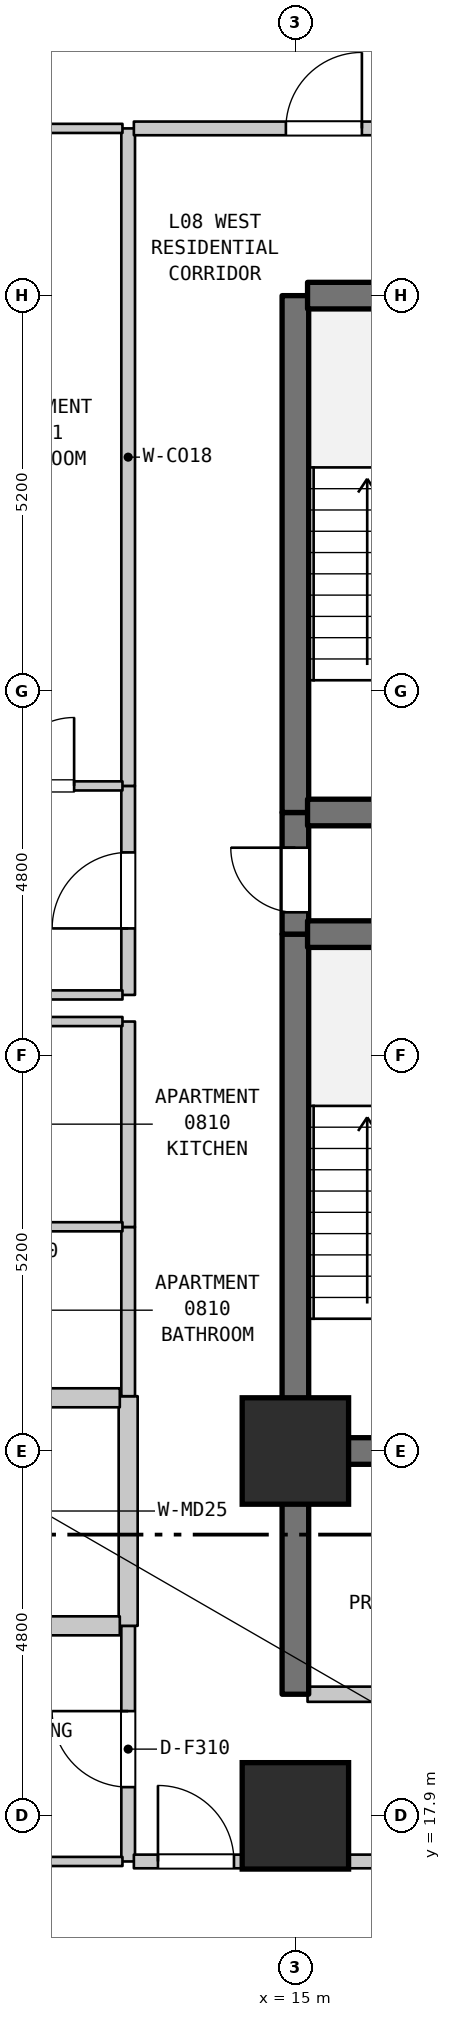
"""IFC4 building model, lengths in metres.
Left out: names, types, materials, properties, quantities, classifications, styles, units other than length and angle.
Written with IfcOpenShell. Run it as: python <this file> out.ifc"""

import sys

from ifc_helpers import new_model, si_unit, direction, frame, frame_2d, origin, origin_2d, place, context, subcontext, project, spatial, rectangle, extrude, element, fill, save


model = new_model("IFC4")
c1 = context("Model", 3, precision=1e-05, world=origin(), true_north=direction((0.0, 1.0)))
c2 = subcontext(c1, "Body", "Model", "MODEL_VIEW")
j1 = project(units=[si_unit("LENGTHUNIT", "METRE"), si_unit("PLANEANGLEUNIT", "RADIAN")], contexts=[c1])
p1 = place(None, origin())
s1 = spatial("IfcSite", under=j1, at=p1, CompositionType="ELEMENT")
p2 = place(p1, origin())
s2 = spatial("IfcBuilding", under=s1, at=p2, CompositionType="ELEMENT")
p3 = place(p2, frame((0.0, 0.0, 38.8)))
s3 = spatial("IfcBuildingStorey", under=s2, at=p3, CompositionType="ELEMENT", Elevation=38.8)
for number, where, z_axis, x_axis in (
    (1, (15.0, 17.9, 0.0), (0.0, 0.0, 1.0), (1.0, 0.0, 0.0)),
    (2, (15.0, 22.7, 0.0), (0.0, 0.0, 1.0), (1.0, 0.0, 0.0)),
):
    element("IfcColumn", number, at=place(p3, frame(where, z_axis=z_axis, x_axis=x_axis)), inside=s3, PredefinedType="COLUMN", context=c2, shape_type="SweptSolid", body=[
        extrude(rectangle(XDim=1.4, YDim=1.4, at=origin_2d()), origin(), (0.0, 0.0, 1.0), 3.7),
    ])
p4 = place(p3, frame((12.8, 17.3, 0.0), z_axis=(0.0, 0.0, 1.0), x_axis=(0.0, 1.0, 0.0)))
e3 = element("IfcWall", 3, at=p4, inside=s3, PredefinedType="STANDARD", context=c2, shape_type="SweptSolid", body=[
    extrude(rectangle(XDim=3.1, YDim=0.18, at=frame_2d((1.55, 0.0))), origin(), (0.0, 0.0, 1.0), 3.385),
])
p5 = place(p4, frame((0.978, 0.0, 0.0)))
e4 = element("IfcOpeningElement", 4, at=p5, cuts=e3, PredefinedType="OPENING", context=c2, shape_type="SweptSolid", body=[
    extrude(rectangle(XDim=1.0, YDim=2.15, at=frame_2d((0.5, 1.075))), frame((0.0, 0.1, 0.0), z_axis=(0.0, -1.0, 0.0), x_axis=(1.0, 0.0, 0.0)), (0.0, 0.0, 1.0), 0.2),
])
p6 = place(p3, frame((12.8, 20.4, 0.0), z_axis=(0.0, 0.0, 1.0), x_axis=(0.0, 1.0, 0.0)))
e5 = element("IfcWall", 5, at=p6, inside=s3, PredefinedType="STANDARD", context=c2, shape_type="SweptSolid", body=[
    extrude(rectangle(XDim=3.021, YDim=0.25, at=frame_2d((1.51, 0.0))), origin(), (0.0, 0.0, 1.0), 3.385),
])
p7 = place(p3, frame((12.8, 23.421, 0.0), z_axis=(0.0, 0.0, 1.0), x_axis=(0.0, 1.0, 0.0)))
e6 = element("IfcWall", 6, at=p7, inside=s3, PredefinedType="STANDARD", context=c2, shape_type="SweptSolid", body=[
    extrude(rectangle(XDim=2.226, YDim=0.18, at=frame_2d((1.113, 0.0))), origin(), (0.0, 0.0, 1.0), 3.385),
])
p8 = place(p3, frame((12.8, 25.647, 0.0), z_axis=(0.0, 0.0, 1.0), x_axis=(0.0, 1.0, 0.0)))
e7 = element("IfcWall", 7, at=p8, inside=s3, PredefinedType="STANDARD", context=c2, shape_type="SweptSolid", body=[
    extrude(rectangle(XDim=2.703, YDim=0.18, at=frame_2d((1.352, 0.0))), origin(), (0.0, 0.0, 1.0), 3.385),
])
p9 = place(p3, frame((12.8, 28.7, 0.0), z_axis=(0.0, 0.0, 1.0), x_axis=(0.0, 1.0, 0.0)))
e8 = element("IfcWall", 8, at=p9, inside=s3, PredefinedType="STANDARD", context=c2, shape_type="SweptSolid", body=[
    extrude(rectangle(XDim=2.75, YDim=0.18, at=frame_2d((1.375, 0.0))), origin(), (0.0, 0.0, 1.0), 3.385),
])
p10 = place(p9, frame((0.875, 0.0, 0.0)))
e9 = element("IfcOpeningElement", 9, at=p10, cuts=e8, PredefinedType="OPENING", context=c2, shape_type="SweptSolid", body=[
    extrude(rectangle(XDim=1.0, YDim=2.15, at=frame_2d((0.5, 1.075))), frame((0.0, 0.1, 0.0), z_axis=(0.0, -1.0, 0.0), x_axis=(1.0, 0.0, 0.0)), (0.0, 0.0, 1.0), 0.2),
])
p11 = place(p3, frame((12.8, 31.45, 0.0), z_axis=(0.0, 0.0, 1.0), x_axis=(0.0, 1.0, 0.0)))
e10 = element("IfcWall", 10, at=p11, inside=s3, PredefinedType="STANDARD", context=c2, shape_type="SweptSolid", body=[
    extrude(rectangle(XDim=8.65, YDim=0.18, at=frame_2d((4.325, 0.0))), origin(), (0.0, 0.0, 1.0), 3.385),
])
p12 = place(p3, frame((15.0, 19.5, 0.0), z_axis=(0.0, 0.0, 1.0), x_axis=(0.0, 1.0, 0.0)))
e11 = element("IfcWall", 11, at=p12, inside=s3, PredefinedType="SHEAR", context=c2, shape_type="SweptSolid", body=[
    extrude(rectangle(XDim=3.2, YDim=0.35, at=frame_2d((1.6, 0.0))), origin(), (0.0, 0.0, 1.0), 3.385),
])
p13 = place(p3, frame((15.0, 22.7, 0.0), z_axis=(0.0, 0.0, 1.0), x_axis=(0.0, 1.0, 0.0)))
e12 = element("IfcWall", 12, at=p13, inside=s3, PredefinedType="SHEAR", context=c2, shape_type="SweptSolid", body=[
    extrude(rectangle(XDim=6.8, YDim=0.35, at=frame_2d((3.4, 0.0))), origin(), (0.0, 0.0, 1.0), 3.385),
])
p14 = place(p3, frame((15.0, 29.5, 0.0), z_axis=(0.0, 0.0, 1.0), x_axis=(0.0, 1.0, 0.0)))
e13 = element("IfcWall", 13, at=p14, inside=s3, PredefinedType="SHEAR", context=c2, shape_type="SweptSolid", body=[
    extrude(rectangle(XDim=1.6, YDim=0.35, at=frame_2d((0.8, 0.0))), origin(), (0.0, 0.0, 1.0), 3.385),
])
p15 = place(p14, frame((0.287, 0.0, 0.0)))
e14 = element("IfcOpeningElement", 14, at=p15, cuts=e13, PredefinedType="OPENING", context=c2, shape_type="SweptSolid", body=[
    extrude(rectangle(XDim=0.85, YDim=2.1, at=frame_2d((0.425, 1.05))), frame((0.0, 0.185, 0.0), z_axis=(0.0, -1.0, 0.0), x_axis=(1.0, 0.0, 0.0)), (0.0, 0.0, 1.0), 0.37),
])
p16 = place(p3, frame((15.0, 31.1, 0.0), z_axis=(0.0, 0.0, 1.0), x_axis=(0.0, 1.0, 0.0)))
e15 = element("IfcWall", 15, at=p16, inside=s3, PredefinedType="SHEAR", context=c2, shape_type="SweptSolid", body=[
    extrude(rectangle(XDim=6.8, YDim=0.35, at=frame_2d((3.4, 0.0))), origin(), (0.0, 0.0, 1.0), 3.385),
])
p17 = place(p3, frame((9.085, 17.3, 0.0), z_axis=(0.0, 0.0, 1.0), x_axis=(1.0, 0.0, 0.0)))
e16 = element("IfcWall", 16, at=p17, inside=s3, PredefinedType="PARTITIONING", context=c2, shape_type="SweptSolid", body=[
    extrude(rectangle(XDim=3.64, YDim=0.12, at=frame_2d((1.82, 0.0))), origin(), (0.0, 0.0, 1.0), 3.385),
])
p18 = place(p3, frame((12.875, 17.3, 0.0), z_axis=(0.0, 0.0, 1.0), x_axis=(1.0, 0.0, 0.0)))
e17 = element("IfcWall", 17, at=p18, inside=s3, PredefinedType="STANDARD", context=c2, shape_type="SweptSolid", body=[
    extrude(rectangle(XDim=3.78, YDim=0.18, at=frame_2d((1.89, 0.0))), origin(), (0.0, 0.0, 1.0), 3.385),
])
p19 = place(p18, frame((0.317, 0.0, 0.0)))
e18 = element("IfcOpeningElement", 18, at=p19, cuts=e17, PredefinedType="OPENING", context=c2, shape_type="SweptSolid", body=[
    extrude(rectangle(XDim=1.0, YDim=2.15, at=frame_2d((0.5, 1.075))), frame((0.0, 0.1, 0.0), z_axis=(0.0, -1.0, 0.0), x_axis=(1.0, 0.0, 0.0)), (0.0, 0.0, 1.0), 0.2),
])
p20 = place(p3, frame((15.16, 19.5, 0.0), z_axis=(0.0, 0.0, 1.0), x_axis=(1.0, 0.0, 0.0)))
e19 = element("IfcWall", 19, at=p20, inside=s3, PredefinedType="STANDARD", context=c2, shape_type="SweptSolid", body=[
    extrude(rectangle(XDim=3.68, YDim=0.2, at=frame_2d((1.84, 0.0))), origin(), (0.0, 0.0, 1.0), 3.385),
])
p21 = place(p20, frame((1.39, 0.0, 0.0)))
e20 = element("IfcOpeningElement", 20, at=p21, cuts=e19, PredefinedType="OPENING", context=c2, shape_type="SweptSolid", body=[
    extrude(rectangle(XDim=0.9, YDim=2.15, at=frame_2d((0.45, 1.075))), frame((0.0, 0.11, 0.0), z_axis=(0.0, -1.0, 0.0), x_axis=(1.0, 0.0, 0.0)), (0.0, 0.0, 1.0), 0.22),
])
p22 = place(p3, frame((10.66, 20.4, 0.0), z_axis=(0.0, 0.0, 1.0), x_axis=(1.0, 0.0, 0.0)))
e21 = element("IfcWall", 21, at=p22, inside=s3, PredefinedType="STANDARD", context=c2, shape_type="SweptSolid", body=[
    extrude(rectangle(XDim=2.03, YDim=0.25, at=frame_2d((1.015, 0.0))), origin(), (0.0, 0.0, 1.0), 3.385),
])
p23 = place(p3, frame((15.16, 22.7, 0.0), z_axis=(0.0, 0.0, 1.0), x_axis=(1.0, 0.0, 0.0)))
e22 = element("IfcWall", 22, at=p23, inside=s3, PredefinedType="SHEAR", context=c2, shape_type="SweptSolid", body=[
    extrude(rectangle(XDim=3.68, YDim=0.35, at=frame_2d((1.84, 0.0))), origin(), (0.0, 0.0, 1.0), 3.385),
])
p24 = place(p3, frame((10.66, 23.4, 0.0), z_axis=(0.0, 0.0, 1.0), x_axis=(1.0, 0.0, 0.0)))
e23 = element("IfcWall", 23, at=p24, inside=s3, PredefinedType="STANDARD", context=c2, shape_type="SweptSolid", body=[
    extrude(rectangle(XDim=2.03, YDim=0.25, at=frame_2d((1.015, 0.0))), origin(), (0.0, 0.0, 1.0), 3.385),
])
for number, where, z_axis, x_axis in (
    (24, (10.595, 25.65, 0.0), (0.0, 0.0, 1.0), (1.0, 0.0, 0.0)),
    (25, (10.595, 28.35, 0.0), (0.0, 0.0, 1.0), (1.0, 0.0, 0.0)),
):
    element("IfcWall", number, at=place(p3, frame(where, z_axis=z_axis, x_axis=x_axis)), inside=s3, PredefinedType="PARTITIONING", context=c2, shape_type="SweptSolid", body=[
        extrude(rectangle(XDim=2.13, YDim=0.12, at=frame_2d((1.065, 0.0))), origin(), (0.0, 0.0, 1.0), 3.385),
    ])
p25 = place(p3, frame((9.03, 28.7, 0.0), z_axis=(0.0, 0.0, 1.0), x_axis=(1.0, 0.0, 0.0)))
e26 = element("IfcWall", 26, at=p25, inside=s3, PredefinedType="PARTITIONING", context=c2, shape_type="SweptSolid", body=[
    extrude(rectangle(XDim=3.695, YDim=0.12, at=frame_2d((1.848, 0.0))), origin(), (0.0, 0.0, 1.0), 3.385),
])
for number, where, z_axis, x_axis in (
    (27, (15.16, 29.5, 0.0), (0.0, 0.0, 1.0), (1.0, 0.0, 0.0)),
    (28, (15.16, 31.1, 0.0), (0.0, 0.0, 1.0), (1.0, 0.0, 0.0)),
):
    element("IfcWall", number, at=place(p3, frame(where, z_axis=z_axis, x_axis=x_axis)), inside=s3, PredefinedType="SHEAR", context=c2, shape_type="SweptSolid", body=[
        extrude(rectangle(XDim=3.68, YDim=0.35, at=frame_2d((1.84, 0.0))), origin(), (0.0, 0.0, 1.0), 3.385),
    ])
p26 = place(p3, frame((10.523, 31.45, 0.0), z_axis=(0.0, 0.0, 1.0), x_axis=(1.0, 0.0, 0.0)))
e29 = element("IfcWall", 29, at=p26, inside=s3, PredefinedType="PARTITIONING", context=c2, shape_type="SweptSolid", body=[
    extrude(rectangle(XDim=2.202, YDim=0.12, at=frame_2d((1.101, 0.0))), origin(), (0.0, 0.0, 1.0), 3.385),
])
p27 = place(p26, frame((0.666, 0.0, 0.0)))
e30 = element("IfcOpeningElement", 30, at=p27, cuts=e29, PredefinedType="OPENING", context=c2, shape_type="SweptSolid", body=[
    extrude(rectangle(XDim=0.9, YDim=2.1, at=frame_2d((0.45, 1.05))), frame((0.0, 0.07, 0.0), z_axis=(0.0, -1.0, 0.0), x_axis=(1.0, 0.0, 0.0)), (0.0, 0.0, 1.0), 0.14),
])
p28 = place(p3, frame((15.16, 37.9, 0.0), z_axis=(0.0, 0.0, 1.0), x_axis=(1.0, 0.0, 0.0)))
e31 = element("IfcWall", 31, at=p28, inside=s3, PredefinedType="SHEAR", context=c2, shape_type="SweptSolid", body=[
    extrude(rectangle(XDim=3.68, YDim=0.35, at=frame_2d((1.84, 0.0))), origin(), (0.0, 0.0, 1.0), 3.385),
])
p29 = place(p3, frame((10.523, 40.1, 0.0), z_axis=(0.0, 0.0, 1.0), x_axis=(1.0, 0.0, 0.0)))
e32 = element("IfcWall", 32, at=p29, inside=s3, PredefinedType="PARTITIONING", context=c2, shape_type="SweptSolid", body=[
    extrude(rectangle(XDim=2.202, YDim=0.12, at=frame_2d((1.101, 0.0))), origin(), (0.0, 0.0, 1.0), 3.385),
])
p30 = place(p3, frame((12.875, 40.1, 0.0), z_axis=(0.0, 0.0, 1.0), x_axis=(1.0, 0.0, 0.0)))
e33 = element("IfcWall", 33, at=p30, inside=s3, PredefinedType="STANDARD", context=c2, shape_type="SweptSolid", body=[
    extrude(rectangle(XDim=5.03, YDim=0.18, at=frame_2d((2.515, 0.0))), origin(), (0.0, 0.0, 1.0), 3.385),
])
p31 = place(p30, frame((2.0, 0.0, 0.0)))
e34 = element("IfcOpeningElement", 34, at=p31, cuts=e33, PredefinedType="OPENING", context=c2, shape_type="SweptSolid", body=[
    extrude(rectangle(XDim=1.0, YDim=2.15, at=frame_2d((0.5, 1.075))), frame((0.0, 0.1, 0.0), z_axis=(0.0, -1.0, 0.0), x_axis=(1.0, 0.0, 0.0)), (0.0, 0.0, 1.0), 0.2),
])
p32 = place(p5, origin())
e35 = element("IfcDoor", 35, at=p32, inside=s3, OperationType="SINGLE_SWING_RIGHT", PredefinedType="DOOR", context=c2, shape_type="SweptSolid", body=[
    extrude(rectangle(XDim=1.0, YDim=2.15, at=frame_2d((0.5, 1.075))), frame((0.0, 0.025, 0.0), z_axis=(0.0, -1.0, 0.0), x_axis=(1.0, 0.0, 0.0)), (0.0, 0.0, 1.0), 0.05),
])
fill(e4, e35)
p33 = place(p10, origin())
e36 = element("IfcDoor", 36, at=p33, inside=s3, OperationType="SINGLE_SWING_LEFT", PredefinedType="DOOR", context=c2, shape_type="SweptSolid", body=[
    extrude(rectangle(XDim=1.0, YDim=2.15, at=frame_2d((0.5, 1.075))), frame((0.0, 0.025, 0.0), z_axis=(0.0, -1.0, 0.0), x_axis=(1.0, 0.0, 0.0)), (0.0, 0.0, 1.0), 0.05),
])
fill(e9, e36)
p34 = place(p15, origin())
e37 = element("IfcDoor", 37, at=p34, inside=s3, OperationType="SINGLE_SWING_RIGHT", PredefinedType="DOOR", context=c2, shape_type="SweptSolid", body=[
    extrude(rectangle(XDim=0.85, YDim=2.1, at=frame_2d((0.425, 1.05))), frame((0.0, 0.025, 0.0), z_axis=(0.0, -1.0, 0.0), x_axis=(1.0, 0.0, 0.0)), (0.0, 0.0, 1.0), 0.05),
])
fill(e14, e37)
p35 = place(p19, origin())
e38 = element("IfcDoor", 38, at=p35, inside=s3, OperationType="SINGLE_SWING_LEFT", PredefinedType="DOOR", context=c2, shape_type="SweptSolid", body=[
    extrude(rectangle(XDim=1.0, YDim=2.15, at=frame_2d((0.5, 1.075))), frame((0.0, 0.025, 0.0), z_axis=(0.0, -1.0, 0.0), x_axis=(1.0, 0.0, 0.0)), (0.0, 0.0, 1.0), 0.05),
])
fill(e18, e38)
p36 = place(p27, origin())
e39 = element("IfcDoor", 39, at=p36, inside=s3, OperationType="SINGLE_SWING_RIGHT", PredefinedType="DOOR", context=c2, shape_type="SweptSolid", body=[
    extrude(rectangle(XDim=0.9, YDim=2.1, at=frame_2d((0.45, 1.05))), frame((0.0, 0.025, 0.0), z_axis=(0.0, -1.0, 0.0), x_axis=(1.0, 0.0, 0.0)), (0.0, 0.0, 1.0), 0.05),
])
fill(e30, e39)
p37 = place(p31, origin())
e40 = element("IfcDoor", 40, at=p37, inside=s3, OperationType="SINGLE_SWING_RIGHT", PredefinedType="DOOR", context=c2, shape_type="SweptSolid", body=[
    extrude(rectangle(XDim=1.0, YDim=2.15, at=frame_2d((0.5, 1.075))), frame((0.0, 0.025, 0.0), z_axis=(0.0, -1.0, 0.0), x_axis=(1.0, 0.0, 0.0)), (0.0, 0.0, 1.0), 0.05),
])
fill(e34, e40)
save(model, sys.argv[1])
